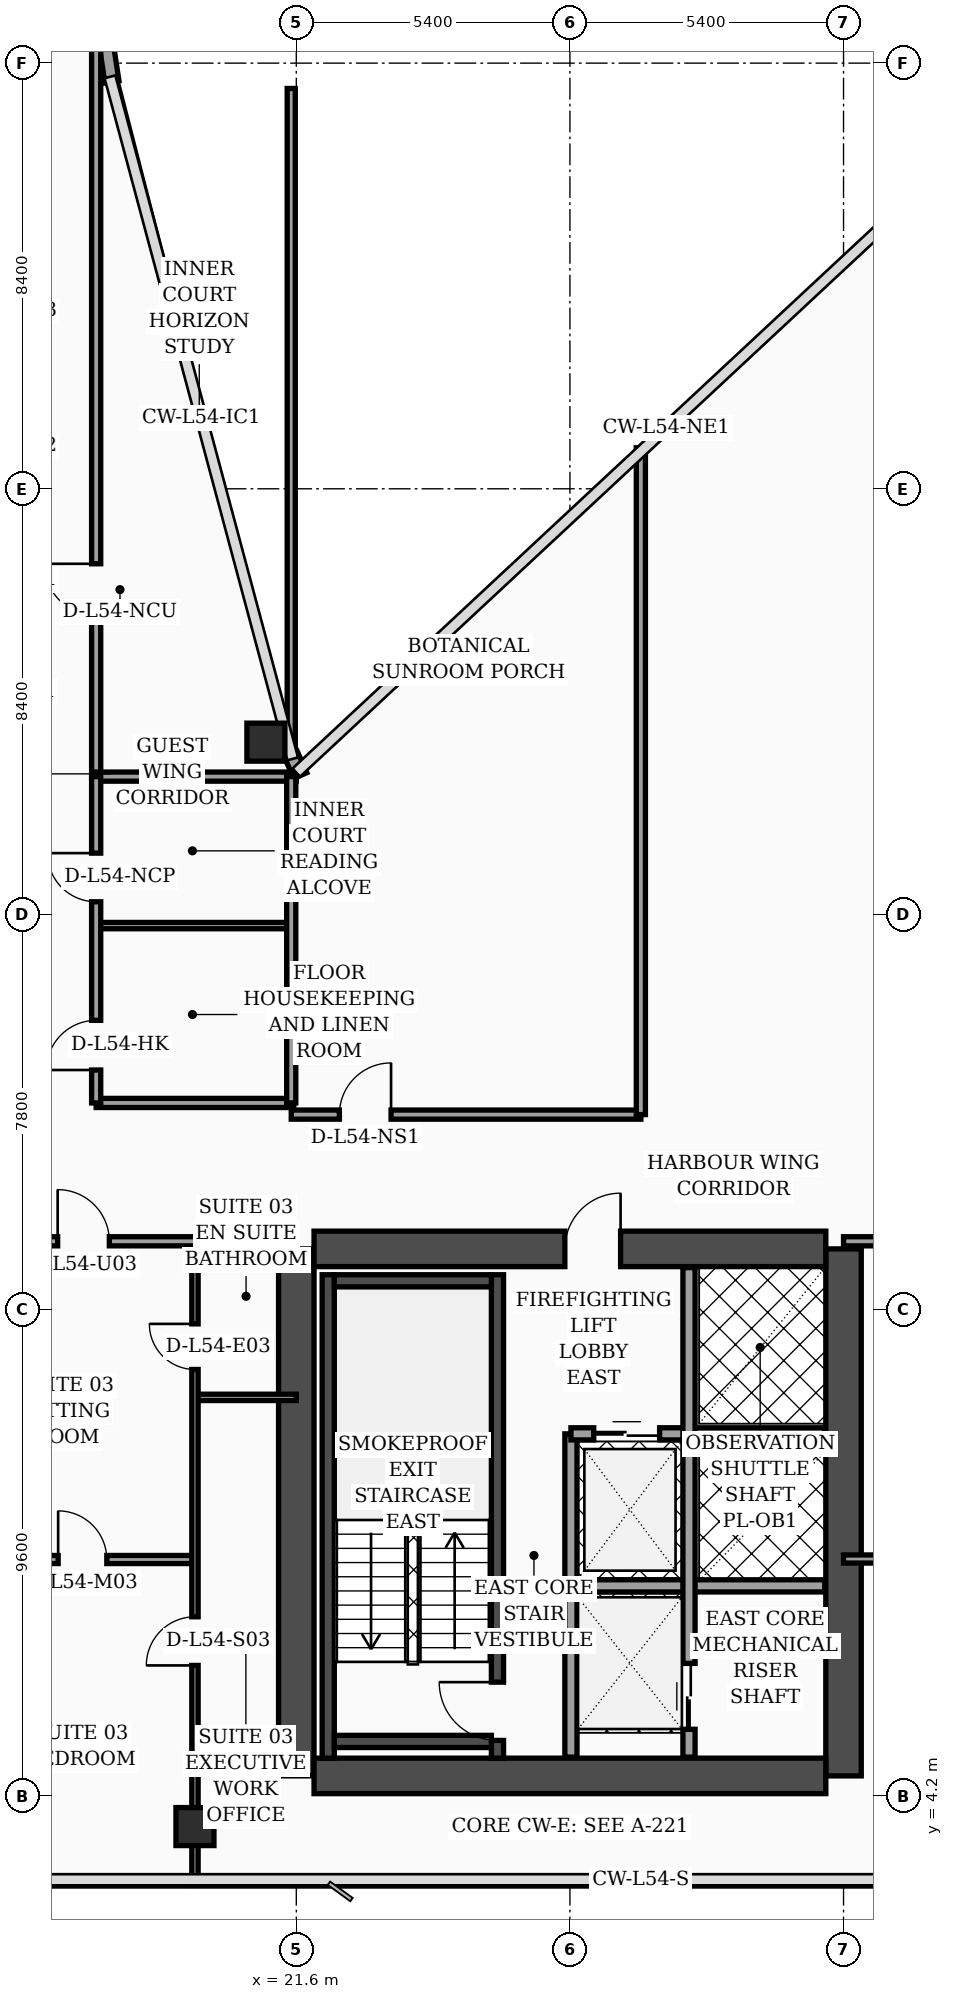
"""IFC4 building model, lengths in metres.
Left out: names, types, materials, properties, quantities, classifications, styles, units other than length and angle.
Written with IfcOpenShell. Run it as: python <this file> out.ifc"""

import sys

from ifc_helpers import new_model, si_unit, direction, frame, frame_2d, origin, origin_2d, place, context, subcontext, project, spatial, rectangle, hollow_rectangle, extrude, element, fill, save


model = new_model("IFC4")
c1 = context("Model", 3, precision=1e-05, world=origin(), true_north=direction((0.0, 1.0)))
c2 = subcontext(c1, "Body", "Model", "MODEL_VIEW")
j1 = project(units=[si_unit("LENGTHUNIT", "METRE"), si_unit("PLANEANGLEUNIT", "RADIAN")], contexts=[c1])
p1 = place(None, origin())
s1 = spatial("IfcSite", under=j1, at=p1, CompositionType="ELEMENT")
p2 = place(p1, origin())
s2 = spatial("IfcBuilding", under=s1, at=p2, CompositionType="ELEMENT")
p3 = place(p2, frame((0.0, 0.0, 219.3)))
s3 = spatial("IfcBuildingStorey", under=s2, at=p3, CompositionType="ELEMENT", Elevation=219.3)
for number, where, z_axis, x_axis in (
    (1, (21.6, 4.6, 0.0), (0.0, 0.0, 1.0), (0.0, 1.0, 0.0)),
    (2, (32.4, 4.6, 0.0), (0.0, 0.0, 1.0), (0.0, 1.0, 0.0)),
):
    element("IfcWall", number, at=place(p3, frame(where, z_axis=z_axis, x_axis=x_axis)), inside=s3, PredefinedType="SHEAR", context=c2, shape_type="SweptSolid", body=[
        extrude(rectangle(XDim=10.4, YDim=0.7, at=frame_2d((5.2, 0.0))), origin(), (0.0, 0.0, 1.0), 3.56),
    ])
p4 = place(p3, frame((21.95, 15.0, 0.0), z_axis=(0.0, 0.0, 1.0), x_axis=(1.0, 0.0, 0.0)))
e3 = element("IfcWall", 3, at=p4, inside=s3, PredefinedType="SHEAR", context=c2, shape_type="SweptSolid", body=[
    extrude(rectangle(XDim=10.1, YDim=0.7, at=frame_2d((5.05, 0.0))), origin(), (0.0, 0.0, 1.0), 3.56),
])
p5 = place(p4, frame((4.95, 0.0, 0.0)))
e4 = element("IfcOpeningElement", 4, at=p5, cuts=e3, PredefinedType="OPENING", context=c2, shape_type="SweptSolid", body=[
    extrude(rectangle(XDim=1.1, YDim=2.2, at=frame_2d((0.55, 1.1))), frame((0.0, 0.36, 0.0), z_axis=(0.0, -1.0, 0.0), x_axis=(1.0, 0.0, 0.0)), (0.0, 0.0, 1.0), 0.72),
])
p6 = place(p3, frame((21.95, 4.6, 0.0), z_axis=(0.0, 0.0, 1.0), x_axis=(1.0, 0.0, 0.0)))
e5 = element("IfcWall", 5, at=p6, inside=s3, PredefinedType="SHEAR", context=c2, shape_type="SweptSolid", body=[
    extrude(rectangle(XDim=10.1, YDim=0.7, at=frame_2d((5.05, 0.0))), origin(), (0.0, 0.0, 1.0), 3.56),
])
p7 = place(p3, frame((22.23, 4.95, 0.0), z_axis=(0.0, 0.0, 1.0), x_axis=(0.0, 1.0, 0.0)))
e6 = element("IfcWall", 6, at=p7, inside=s3, PredefinedType="SOLIDWALL", context=c2, shape_type="SweptSolid", body=[
    extrude(rectangle(XDim=9.54, YDim=0.24, at=frame_2d((4.77, 0.0))), origin(), (0.0, 0.0, 1.0), 3.56),
])
p8 = place(p3, frame((25.57, 4.95, 0.0), z_axis=(0.0, 0.0, 1.0), x_axis=(0.0, 1.0, 0.0)))
e7 = element("IfcWall", 7, at=p8, inside=s3, PredefinedType="SOLIDWALL", context=c2, shape_type="SweptSolid", body=[
    extrude(rectangle(XDim=9.54, YDim=0.24, at=frame_2d((4.77, 0.0))), origin(), (0.0, 0.0, 1.0), 3.56),
])
p9 = place(p8, frame((0.35, 0.0, 0.0)))
e8 = element("IfcOpeningElement", 8, at=p9, cuts=e7, PredefinedType="OPENING", context=c2, shape_type="SweptSolid", body=[
    extrude(rectangle(XDim=1.15, YDim=2.2, at=frame_2d((0.575, 1.1))), frame((0.0, 0.13, 0.0), z_axis=(0.0, -1.0, 0.0), x_axis=(1.0, 0.0, 0.0)), (0.0, 0.0, 1.0), 0.26),
])
for number, where, z_axis, x_axis in (
    (9, (22.35, 5.28, 0.0), (0.0, 0.0, 1.0), (1.0, 0.0, 0.0)),
    (10, (22.35, 14.37, 0.0), (0.0, 0.0, 1.0), (1.0, 0.0, 0.0)),
):
    element("IfcWall", number, at=place(p3, frame(where, z_axis=z_axis, x_axis=x_axis)), inside=s3, PredefinedType="SOLIDWALL", context=c2, shape_type="SweptSolid", body=[
        extrude(rectangle(XDim=3.1, YDim=0.24, at=frame_2d((1.55, 0.0))), origin(), (0.0, 0.0, 1.0), 3.56),
    ])
for number, where, z_axis, x_axis in (
    (11, (21.0, 25.0, 0.0), (0.0, 0.0, 1.0), (1.0, 0.0, 0.0)),
    (12, (19.6, 3.6, 0.0), (0.0, 0.0, 1.0), (1.0, 0.0, 0.0)),
):
    element("IfcColumn", number, at=place(p3, frame(where, z_axis=z_axis, x_axis=x_axis)), inside=s3, PredefinedType="COLUMN", context=c2, shape_type="SweptSolid", body=[
        extrude(hollow_rectangle(XDim=0.75, YDim=0.75, WallThickness=0.032, at=origin_2d()), origin(), (0.0, 0.0, 1.0), 3.56),
    ])
p10 = place(p3, frame((21.68, 24.34, 0.0), z_axis=(0.0, 0.0, 1.0), x_axis=(-0.40758134973, 0.913168901875, 0.0)))
e13 = element("IfcWall", 13, at=p10, inside=s3, PredefinedType="SOLIDWALL", context=c2, shape_type="SweptSolid", body=[
    extrude(rectangle(XDim=0.471, YDim=0.28, at=frame_2d((0.235, 0.0))), origin(), (0.0, 0.0, 1.0), 3.56),
])
p11 = place(p3, frame((17.962, 38.03, 0.0), z_axis=(0.0, 0.0, 1.0), x_axis=(-0.15141125477, 0.988470855377, 0.0)))
e14 = element("IfcWall", 14, at=p11, inside=s3, PredefinedType="SOLIDWALL", context=c2, shape_type="SweptSolid", body=[
    extrude(rectangle(XDim=0.739, YDim=0.28, at=frame_2d((0.369, 0.0))), origin(), (0.0, 0.0, 1.0), 3.56),
])
p12 = place(p3, frame((27.02, 4.97, 0.0), z_axis=(0.0, 0.0, 1.0), x_axis=(0.0, 1.0, 0.0)))
e15 = element("IfcWall", 15, at=p12, inside=s3, PredefinedType="SOLIDWALL", context=c2, shape_type="SweptSolid", body=[
    extrude(rectangle(XDim=6.38, YDim=0.24, at=frame_2d((3.19, 0.0))), origin(), (0.0, 0.0, 1.0), 3.56),
])
p13 = place(p3, frame((27.02, 11.35, 0.0), z_axis=(0.0, 0.0, 1.0), x_axis=(1.0, 0.0, 0.0)))
e16 = element("IfcWall", 16, at=p13, inside=s3, PredefinedType="SOLIDWALL", context=c2, shape_type="SweptSolid", body=[
    extrude(rectangle(XDim=5.01, YDim=0.24, at=frame_2d((2.505, 0.0))), origin(), (0.0, 0.0, 1.0), 3.56),
])
p14 = place(p13, frame((0.45, 0.0, 0.0)))
e17 = element("IfcOpeningElement", 17, at=p14, cuts=e16, PredefinedType="OPENING", context=c2, shape_type="SweptSolid", body=[
    extrude(rectangle(XDim=1.3, YDim=2.35, at=frame_2d((0.65, 1.175))), frame((0.0, 0.13, 0.0), z_axis=(0.0, -1.0, 0.0), x_axis=(1.0, 0.0, 0.0)), (0.0, 0.0, 1.0), 0.26),
])
p15 = place(p3, frame((27.02, 8.35, 0.0), z_axis=(0.0, 0.0, 1.0), x_axis=(1.0, 0.0, 0.0)))
e18 = element("IfcWall", 18, at=p15, inside=s3, PredefinedType="SOLIDWALL", context=c2, shape_type="SweptSolid", body=[
    extrude(rectangle(XDim=5.01, YDim=0.24, at=frame_2d((2.505, 0.0))), origin(), (0.0, 0.0, 1.0), 3.56),
])
p16 = place(p3, frame((29.35, 4.97, 0.0), z_axis=(0.0, 0.0, 1.0), x_axis=(0.0, 1.0, 0.0)))
e19 = element("IfcWall", 19, at=p16, inside=s3, PredefinedType="SOLIDWALL", context=c2, shape_type="SweptSolid", body=[
    extrude(rectangle(XDim=9.66, YDim=0.24, at=frame_2d((4.83, 0.0))), origin(), (0.0, 0.0, 1.0), 3.56),
])
p17 = place(p16, frame((0.55, 0.0, 0.0)))
e20 = element("IfcOpeningElement", 20, at=p17, cuts=e19, PredefinedType="OPENING", context=c2, shape_type="SweptSolid", body=[
    extrude(rectangle(XDim=1.3, YDim=2.35, at=frame_2d((0.65, 1.175))), frame((0.0, 0.13, 0.0), z_axis=(0.0, -1.0, 0.0), x_axis=(1.0, 0.0, 0.0)), (0.0, 0.0, 1.0), 0.26),
])
p18 = place(p3, frame((19.6, 12.07, 0.0), z_axis=(0.0, 0.0, 1.0), x_axis=(1.0, 0.0, 0.0)))
e21 = element("IfcWall", 21, at=p18, inside=s3, PredefinedType="PARTITIONING", context=c2, shape_type="SweptSolid", body=[
    extrude(rectangle(XDim=2.0, YDim=0.125, at=frame_2d((1.0, 0.0))), origin(), (0.0, 0.0, 1.0), 3.56),
])
p19 = place(p3, frame((15.15, 8.87, 0.0), z_axis=(0.0, 0.0, 1.0), x_axis=(1.0, 0.0, 0.0)))
e22 = element("IfcWall", 22, at=p19, inside=s3, PredefinedType="PARTITIONING", context=c2, shape_type="SweptSolid", body=[
    extrude(rectangle(XDim=4.45, YDim=0.16, at=frame_2d((2.225, 0.0))), origin(), (0.0, 0.0, 1.0), 3.56),
])
p20 = place(p19, frame((1.75, 0.0, 0.0)))
e23 = element("IfcOpeningElement", 23, at=p20, cuts=e22, PredefinedType="OPENING", context=c2, shape_type="SweptSolid", body=[
    extrude(rectangle(XDim=0.96, YDim=2.2, at=frame_2d((0.48, 1.1))), frame((0.0, 0.09, 0.0), z_axis=(0.0, -1.0, 0.0), x_axis=(1.0, 0.0, 0.0)), (0.0, 0.0, 1.0), 0.18),
])
p21 = place(p3, frame((19.6, 2.44, 0.0), z_axis=(0.0, 0.0, 1.0), x_axis=(0.0, 1.0, 0.0)))
e24 = element("IfcWall", 24, at=p21, inside=s3, PredefinedType="PARTITIONING", context=c2, shape_type="SweptSolid", body=[
    extrude(rectangle(XDim=12.71, YDim=0.125, at=frame_2d((6.355, 0.0))), origin(), (0.0, 0.0, 1.0), 2.59),
])
p22 = place(p21, frame((4.34, 0.0, 0.0)))
e25 = element("IfcOpeningElement", 25, at=p22, cuts=e24, PredefinedType="OPENING", context=c2, shape_type="SweptSolid", body=[
    extrude(rectangle(XDim=0.96, YDim=2.2, at=frame_2d((0.48, 1.1))), frame((0.0, 0.073, 0.0), z_axis=(0.0, -1.0, 0.0), x_axis=(1.0, 0.0, 0.0)), (0.0, 0.0, 1.0), 0.145),
])
p23 = place(p21, frame((10.18, 0.0, 0.0)))
e26 = element("IfcOpeningElement", 26, at=p23, cuts=e24, PredefinedType="OPENING", context=c2, shape_type="SweptSolid", body=[
    extrude(rectangle(XDim=0.9, YDim=2.15, at=frame_2d((0.45, 1.075))), frame((0.0, 0.073, 0.0), z_axis=(0.0, -1.0, 0.0), x_axis=(1.0, 0.0, 0.0)), (0.0, 0.0, 1.0), 0.145),
])
p24 = place(p3, frame((15.15, 15.15, 0.0), z_axis=(0.0, 0.0, 1.0), x_axis=(1.0, 0.0, 0.0)))
e27 = element("IfcWall", 27, at=p24, inside=s3, PredefinedType="PARTITIONING", context=c2, shape_type="SweptSolid", body=[
    extrude(rectangle(XDim=6.45, YDim=0.18, at=frame_2d((3.225, 0.0))), origin(), (0.0, 0.0, 1.0), 2.59),
])
p25 = place(p24, frame((1.74, 0.0, 0.0)))
e28 = element("IfcOpeningElement", 28, at=p25, cuts=e27, PredefinedType="OPENING", context=c2, shape_type="SweptSolid", body=[
    extrude(rectangle(XDim=1.02, YDim=2.2, at=frame_2d((0.51, 1.1))), frame((0.0, 0.1, 0.0), z_axis=(0.0, -1.0, 0.0), x_axis=(1.0, 0.0, 0.0)), (0.0, 0.0, 1.0), 0.2),
])
p26 = place(p3, frame((17.65, 24.3, 0.0), z_axis=(0.0, 0.0, 1.0), x_axis=(0.0, 1.0, 0.0)))
e29 = element("IfcWall", 29, at=p26, inside=s3, PredefinedType="PARTITIONING", context=c2, shape_type="SweptSolid", body=[
    extrude(rectangle(XDim=18.15, YDim=0.18, at=frame_2d((9.075, 0.0))), origin(), (0.0, 0.0, 1.0), 2.94),
])
p27 = place(p26, frame((3.2, 0.0, 0.0)))
e30 = element("IfcOpeningElement", 30, at=p27, cuts=e29, PredefinedType="OPENING", context=c2, shape_type="SweptSolid", body=[
    extrude(rectangle(XDim=1.02, YDim=2.2, at=frame_2d((0.51, 1.1))), frame((0.0, 0.1, 0.0), z_axis=(0.0, -1.0, 0.0), x_axis=(1.0, 0.0, 0.0)), (0.0, 0.0, 1.0), 0.2),
])
p28 = place(p3, frame((17.65, 17.88, 0.0), z_axis=(0.0, 0.0, 1.0), x_axis=(1.0, 0.0, 0.0)))
e31 = element("IfcWall", 31, at=p28, inside=s3, PredefinedType="PARTITIONING", context=c2, shape_type="SweptSolid", body=[
    extrude(rectangle(XDim=3.9, YDim=0.18, at=frame_2d((1.95, 0.0))), origin(), (0.0, 0.0, 1.0), 3.09),
])
p29 = place(p3, frame((17.65, 21.38, 0.0), z_axis=(0.0, 0.0, 1.0), x_axis=(1.0, 0.0, 0.0)))
e32 = element("IfcWall", 32, at=p29, inside=s3, PredefinedType="PARTITIONING", context=c2, shape_type="SweptSolid", body=[
    extrude(rectangle(XDim=3.9, YDim=0.125, at=frame_2d((1.95, 0.0))), origin(), (0.0, 0.0, 1.0), 3.56),
])
p30 = place(p3, frame((17.65, 24.32, 0.0), z_axis=(0.0, 0.0, 1.0), x_axis=(1.0, 0.0, 0.0)))
e33 = element("IfcWall", 33, at=p30, inside=s3, PredefinedType="PARTITIONING", context=c2, shape_type="SweptSolid", body=[
    extrude(rectangle(XDim=3.95, YDim=0.18, at=frame_2d((1.975, 0.0))), origin(), (0.0, 0.0, 1.0), 3.56),
])
p31 = place(p3, frame((21.5, 17.88, 0.0), z_axis=(0.0, 0.0, 1.0), x_axis=(0.0, 1.0, 0.0)))
e34 = element("IfcWall", 34, at=p31, inside=s3, PredefinedType="PARTITIONING", context=c2, shape_type="SweptSolid", body=[
    extrude(rectangle(XDim=6.44, YDim=0.18, at=frame_2d((3.22, 0.0))), origin(), (0.0, 0.0, 1.0), 3.09),
])
p32 = place(p3, frame((17.65, 17.88, 0.0), z_axis=(0.0, 0.0, 1.0), x_axis=(0.0, 1.0, 0.0)))
e35 = element("IfcWall", 35, at=p32, inside=s3, PredefinedType="PARTITIONING", context=c2, shape_type="SweptSolid", body=[
    extrude(rectangle(XDim=6.44, YDim=0.18, at=frame_2d((3.22, 0.0))), origin(), (0.0, 0.0, 1.0), 3.09),
])
p33 = place(p32, frame((0.65, 0.0, 0.0)))
e36 = element("IfcOpeningElement", 36, at=p33, cuts=e35, PredefinedType="OPENING", context=c2, shape_type="SweptSolid", body=[
    extrude(rectangle(XDim=0.98, YDim=2.15, at=frame_2d((0.49, 1.075))), frame((0.0, 0.1, 0.0), z_axis=(0.0, -1.0, 0.0), x_axis=(1.0, 0.0, 0.0)), (0.0, 0.0, 1.0), 0.2),
])
p34 = place(p32, frame((3.97, 0.0, 0.0)))
e37 = element("IfcOpeningElement", 37, at=p34, cuts=e35, PredefinedType="OPENING", context=c2, shape_type="SweptSolid", body=[
    extrude(rectangle(XDim=0.96, YDim=2.2, at=frame_2d((0.48, 1.1))), frame((0.0, 0.1, 0.0), z_axis=(0.0, -1.0, 0.0), x_axis=(1.0, 0.0, 0.0)), (0.0, 0.0, 1.0), 0.2),
])
p35 = place(p3, frame((32.4, 8.88, 0.0), z_axis=(0.0, 0.0, 1.0), x_axis=(1.0, 0.0, 0.0)))
e38 = element("IfcWall", 38, at=p35, inside=s3, PredefinedType="PARTITIONING", context=c2, shape_type="SweptSolid", body=[
    extrude(rectangle(XDim=4.07, YDim=0.16, at=frame_2d((2.035, 0.0))), origin(), (0.0, 0.0, 1.0), 2.94),
])
p36 = place(p35, frame((1.56, 0.0, 0.0)))
e39 = element("IfcOpeningElement", 39, at=p36, cuts=e38, PredefinedType="OPENING", context=c2, shape_type="SweptSolid", body=[
    extrude(rectangle(XDim=0.96, YDim=2.2, at=frame_2d((0.48, 1.1))), frame((0.0, 0.09, 0.0), z_axis=(0.0, -1.0, 0.0), x_axis=(1.0, 0.0, 0.0)), (0.0, 0.0, 1.0), 0.18),
])
p37 = place(p3, frame((32.4, 15.15, 0.0), z_axis=(0.0, 0.0, 1.0), x_axis=(1.0, 0.0, 0.0)))
e40 = element("IfcWall", 40, at=p37, inside=s3, PredefinedType="PARTITIONING", context=c2, shape_type="SweptSolid", body=[
    extrude(rectangle(XDim=10.4, YDim=0.18, at=frame_2d((5.2, 0.0))), origin(), (0.0, 0.0, 1.0), 2.94),
])
p38 = place(p37, frame((1.63, 0.0, 0.0)))
e41 = element("IfcOpeningElement", 41, at=p38, cuts=e40, PredefinedType="OPENING", context=c2, shape_type="SweptSolid", body=[
    extrude(rectangle(XDim=1.02, YDim=2.2, at=frame_2d((0.51, 1.1))), frame((0.0, 0.1, 0.0), z_axis=(0.0, -1.0, 0.0), x_axis=(1.0, 0.0, 0.0)), (0.0, 0.0, 1.0), 0.2),
])
p39 = place(p37, frame((6.72, 0.0, 0.0)))
e42 = element("IfcOpeningElement", 42, at=p39, cuts=e40, PredefinedType="OPENING", context=c2, shape_type="SweptSolid", body=[
    extrude(rectangle(XDim=1.02, YDim=2.2, at=frame_2d((0.51, 1.1))), frame((0.0, 0.1, 0.0), z_axis=(0.0, -1.0, 0.0), x_axis=(1.0, 0.0, 0.0)), (0.0, 0.0, 1.0), 0.2),
])
p40 = place(p3, frame((21.5, 24.85, 0.0), z_axis=(0.0, 0.0, 1.0), x_axis=(0.0, 1.0, 0.0)))
e43 = element("IfcWall", 43, at=p40, inside=s3, PredefinedType="PARTITIONING", context=c2, shape_type="SweptSolid", body=[
    extrude(rectangle(XDim=13.05, YDim=0.16, at=frame_2d((6.525, 0.0))), origin(), (0.0, 0.0, 1.0), 2.94),
])
p41 = place(p3, frame((21.5, 17.65, 0.0), z_axis=(0.0, 0.0, 1.0), x_axis=(1.0, 0.0, 0.0)))
e44 = element("IfcWall", 44, at=p41, inside=s3, PredefinedType="PARTITIONING", context=c2, shape_type="SweptSolid", body=[
    extrude(rectangle(XDim=6.9, YDim=0.18, at=frame_2d((3.45, 0.0))), origin(), (0.0, 0.0, 1.0), 2.94),
])
p42 = place(p41, frame((0.95, 0.0, 0.0)))
e45 = element("IfcOpeningElement", 45, at=p42, cuts=e44, PredefinedType="OPENING", context=c2, shape_type="SweptSolid", body=[
    extrude(rectangle(XDim=1.02, YDim=2.2, at=frame_2d((0.51, 1.1))), frame((0.0, 0.1, 0.0), z_axis=(0.0, -1.0, 0.0), x_axis=(1.0, 0.0, 0.0)), (0.0, 0.0, 1.0), 0.2),
])
p43 = place(p3, frame((28.4, 17.65, 0.0), z_axis=(0.0, 0.0, 1.0), x_axis=(0.0, 1.0, 0.0)))
e46 = element("IfcWall", 46, at=p43, inside=s3, PredefinedType="PARTITIONING", context=c2, shape_type="SweptSolid", body=[
    extrude(rectangle(XDim=13.16, YDim=0.18, at=frame_2d((6.58, 0.0))), origin(), (0.0, 0.0, 1.0), 2.94),
])
p44 = place(p14, origin())
e47 = element("IfcDoor", 47, at=p44, inside=s3, OperationType="DOUBLE_DOOR_SLIDING", PredefinedType="DOOR", context=c2, shape_type="SweptSolid", body=[
    extrude(rectangle(XDim=1.3, YDim=2.35, at=frame_2d((0.65, 1.175))), frame((0.0, 0.025, 0.0), z_axis=(0.0, -1.0, 0.0), x_axis=(1.0, 0.0, 0.0)), (0.0, 0.0, 1.0), 0.05),
])
fill(e17, e47)
p45 = place(p17, origin())
e48 = element("IfcDoor", 48, at=p45, inside=s3, OperationType="DOUBLE_DOOR_SLIDING", PredefinedType="DOOR", context=c2, shape_type="SweptSolid", body=[
    extrude(rectangle(XDim=1.3, YDim=2.35, at=frame_2d((0.65, 1.175))), frame((0.0, 0.025, 0.0), z_axis=(0.0, -1.0, 0.0), x_axis=(1.0, 0.0, 0.0)), (0.0, 0.0, 1.0), 0.05),
])
fill(e20, e48)
p46 = place(p20, origin())
e49 = element("IfcDoor", 49, at=p46, inside=s3, OperationType="SINGLE_SWING_LEFT", PredefinedType="DOOR", context=c2, shape_type="SweptSolid", body=[
    extrude(rectangle(XDim=0.96, YDim=2.2, at=frame_2d((0.48, 1.1))), frame((0.0, 0.025, 0.0), z_axis=(0.0, -1.0, 0.0), x_axis=(1.0, 0.0, 0.0)), (0.0, 0.0, 1.0), 0.05),
])
fill(e23, e49)
p47 = place(p22, origin())
e50 = element("IfcDoor", 50, at=p47, inside=s3, OperationType="SINGLE_SWING_LEFT", PredefinedType="DOOR", context=c2, shape_type="SweptSolid", body=[
    extrude(rectangle(XDim=0.96, YDim=2.2, at=frame_2d((0.48, 1.1))), frame((0.0, 0.025, 0.0), z_axis=(0.0, -1.0, 0.0), x_axis=(1.0, 0.0, 0.0)), (0.0, 0.0, 1.0), 0.05),
])
fill(e25, e50)
p48 = place(p23, origin())
e51 = element("IfcDoor", 51, at=p48, inside=s3, OperationType="SINGLE_SWING_RIGHT", PredefinedType="DOOR", context=c2, shape_type="SweptSolid", body=[
    extrude(rectangle(XDim=0.9, YDim=2.15, at=frame_2d((0.45, 1.075))), frame((0.0, 0.025, 0.0), z_axis=(0.0, -1.0, 0.0), x_axis=(1.0, 0.0, 0.0)), (0.0, 0.0, 1.0), 0.05),
])
fill(e26, e51)
p49 = place(p25, origin())
e52 = element("IfcDoor", 52, at=p49, inside=s3, OperationType="SINGLE_SWING_LEFT", PredefinedType="DOOR", context=c2, shape_type="SweptSolid", body=[
    extrude(rectangle(XDim=1.02, YDim=2.2, at=frame_2d((0.51, 1.1))), frame((0.0, 0.025, 0.0), z_axis=(0.0, -1.0, 0.0), x_axis=(1.0, 0.0, 0.0)), (0.0, 0.0, 1.0), 0.05),
])
fill(e28, e52)
p50 = place(p27, origin())
e53 = element("IfcDoor", 53, at=p50, inside=s3, OperationType="SINGLE_SWING_RIGHT", PredefinedType="DOOR", context=c2, shape_type="SweptSolid", body=[
    extrude(rectangle(XDim=1.02, YDim=2.2, at=frame_2d((0.51, 1.1))), frame((0.0, 0.025, 0.0), z_axis=(0.0, -1.0, 0.0), x_axis=(1.0, 0.0, 0.0)), (0.0, 0.0, 1.0), 0.05),
])
fill(e30, e53)
p51 = place(p33, origin())
e54 = element("IfcDoor", 54, at=p51, inside=s3, OperationType="SINGLE_SWING_LEFT", PredefinedType="DOOR", context=c2, shape_type="SweptSolid", body=[
    extrude(rectangle(XDim=0.98, YDim=2.15, at=frame_2d((0.49, 1.075))), frame((0.0, 0.025, 0.0), z_axis=(0.0, -1.0, 0.0), x_axis=(1.0, 0.0, 0.0)), (0.0, 0.0, 1.0), 0.05),
])
fill(e36, e54)
p52 = place(p34, origin())
e55 = element("IfcDoor", 55, at=p52, inside=s3, OperationType="SINGLE_SWING_RIGHT", PredefinedType="DOOR", context=c2, shape_type="SweptSolid", body=[
    extrude(rectangle(XDim=0.96, YDim=2.2, at=frame_2d((0.48, 1.1))), frame((0.0, 0.025, 0.0), z_axis=(0.0, -1.0, 0.0), x_axis=(1.0, 0.0, 0.0)), (0.0, 0.0, 1.0), 0.05),
])
fill(e37, e55)
p53 = place(p42, origin())
e56 = element("IfcDoor", 56, at=p53, inside=s3, OperationType="SINGLE_SWING_RIGHT", PredefinedType="DOOR", context=c2, shape_type="SweptSolid", body=[
    extrude(rectangle(XDim=1.02, YDim=2.2, at=frame_2d((0.51, 1.1))), frame((0.0, 0.025, 0.0), z_axis=(0.0, -1.0, 0.0), x_axis=(1.0, 0.0, 0.0)), (0.0, 0.0, 1.0), 0.05),
])
fill(e45, e56)
p54 = place(p9, origin())
e57 = element("IfcDoor", 57, at=p54, inside=s3, OperationType="SINGLE_SWING_RIGHT", PredefinedType="DOOR", context=c2, shape_type="SweptSolid", body=[
    extrude(rectangle(XDim=1.15, YDim=2.2, at=frame_2d((0.575, 1.1))), frame((0.0, 0.025, 0.0), z_axis=(0.0, -1.0, 0.0), x_axis=(1.0, 0.0, 0.0)), (0.0, 0.0, 1.0), 0.05),
])
fill(e8, e57)
p55 = place(p5, origin())
e58 = element("IfcDoor", 58, at=p55, inside=s3, OperationType="SINGLE_SWING_RIGHT", PredefinedType="DOOR", context=c2, shape_type="SweptSolid", body=[
    extrude(rectangle(XDim=1.1, YDim=2.2, at=frame_2d((0.55, 1.1))), frame((0.0, 0.025, 0.0), z_axis=(0.0, -1.0, 0.0), x_axis=(1.0, 0.0, 0.0)), (0.0, 0.0, 1.0), 0.05),
])
fill(e4, e58)
save(model, sys.argv[1])
